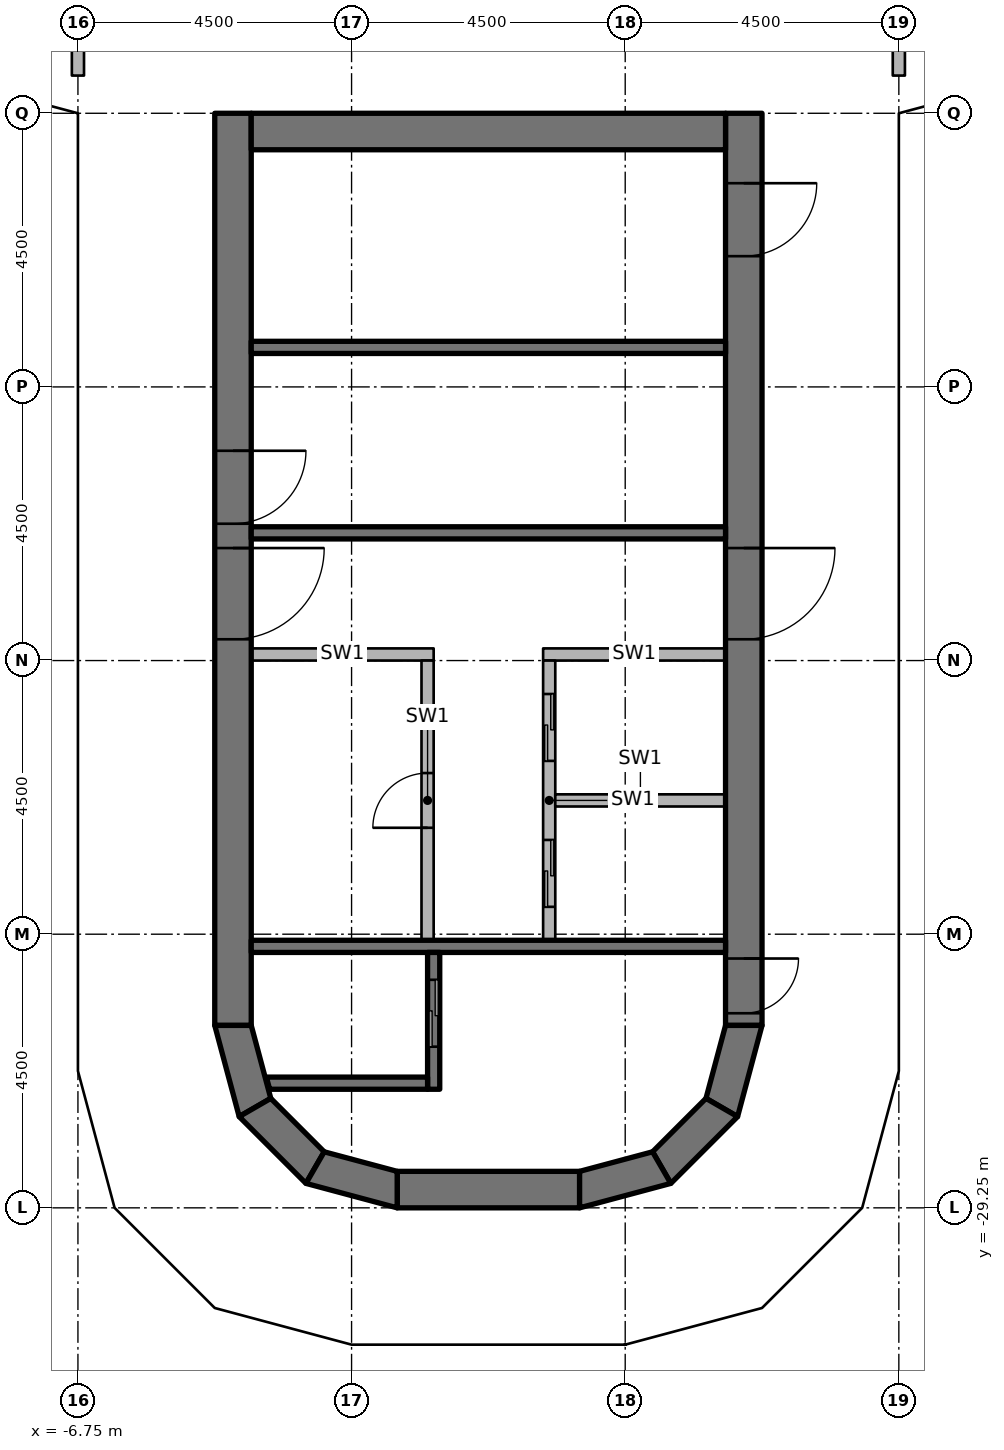
"""IFC4 building model, lengths in metres.
Left out: names, types, materials, properties, quantities, classifications, styles, units other than length and angle.
Written with IfcOpenShell. Run it as: python <this file> out.ifc"""

import sys

from ifc_helpers import new_model, si_unit, direction, frame, frame_2d, origin, origin_2d, place, context, subcontext, project, spatial, polyline, rectangle, outline, extrude, element, fill, save


model = new_model("IFC4")
c1 = context("Model", 3, precision=1e-05, world=origin(), true_north=direction((0.0, 1.0)))
c2 = subcontext(c1, "Body", "Model", "MODEL_VIEW")
j1 = project(units=[si_unit("LENGTHUNIT", "METRE"), si_unit("PLANEANGLEUNIT", "RADIAN")], contexts=[c1])
p1 = place(None, origin())
s1 = spatial("IfcSite", under=j1, at=p1, CompositionType="ELEMENT")
p2 = place(p1, origin())
s2 = spatial("IfcBuilding", under=s1, at=p2, CompositionType="ELEMENT")
p3 = place(p2, frame((0.0, 0.0, 218.2)))
s3 = spatial("IfcBuildingStorey", under=s2, at=p3, CompositionType="ELEMENT", Elevation=218.2)
for number, where, z_axis, x_axis in (
    (1, (-6.25, -26.9, 0.0), (0.0, 0.0, 1.0), (1.0, 0.0, 0.0)),
    (2, (-6.25, -24.65, 0.0), (0.0, 0.0, 1.0), (1.0, 0.0, 0.0)),
    (3, (-6.25, -20.25, 0.0), (0.0, 0.0, 1.0), (1.0, 0.0, 0.0)),
    (4, (-6.25, -15.75, 0.0), (0.0, 0.0, 1.0), (1.0, 0.0, 0.0)),
    (5, (-6.25, -10.75, 0.0), (0.0, 0.0, 1.0), (1.0, 0.0, 0.0)),
    (6, (6.25, -26.9, 0.0), (0.0, 0.0, 1.0), (1.0, 0.0, 0.0)),
    (7, (6.25, -24.65, 0.0), (0.0, 0.0, 1.0), (1.0, 0.0, 0.0)),
    (8, (6.25, -20.25, 0.0), (0.0, 0.0, 1.0), (1.0, 0.0, 0.0)),
    (9, (6.25, -15.75, 0.0), (0.0, 0.0, 1.0), (1.0, 0.0, 0.0)),
    (10, (6.25, -10.75, 0.0), (0.0, 0.0, 1.0), (1.0, 0.0, 0.0)),
):
    element("IfcColumn", number, at=place(p3, frame(where, z_axis=z_axis, x_axis=x_axis)), inside=s3, PredefinedType="COLUMN", context=c2, shape_type="SweptSolid", body=[
        extrude(rectangle(XDim=0.7, YDim=0.7, at=origin_2d()), origin(), (0.0, 0.0, 1.0), 3.65),
    ])
p4 = place(p3, frame((-4.2, -11.25, 0.0), z_axis=(0.0, 0.0, 1.0), x_axis=(0.0, -1.0, 0.0)))
e11 = element("IfcWall", 11, at=p4, inside=s3, PredefinedType="SHEAR", context=c2, shape_type="SweptSolid", body=[
    extrude(rectangle(XDim=15.0, YDim=0.6, at=frame_2d((7.5, 0.0))), origin(), (0.0, 0.0, 1.0), 3.8),
])
p5 = place(p4, frame((7.15, 0.0, 0.0)))
e12 = element("IfcOpeningElement", 12, at=p5, cuts=e11, PredefinedType="OPENING", context=c2, shape_type="SweptSolid", body=[
    extrude(rectangle(XDim=1.5, YDim=2.3, at=frame_2d((0.75, 1.15))), frame((0.0, 0.31, 0.0), z_axis=(0.0, -1.0, 0.0), x_axis=(1.0, 0.0, 0.0)), (0.0, 0.0, 1.0), 0.62),
])
p6 = place(p4, frame((5.55, 0.0, 0.0)))
e13 = element("IfcOpeningElement", 13, at=p6, cuts=e11, PredefinedType="OPENING", context=c2, shape_type="SweptSolid", body=[
    extrude(rectangle(XDim=1.2, YDim=2.1, at=frame_2d((0.6, 1.05))), frame((0.0, 0.31, 0.0), z_axis=(0.0, -1.0, 0.0), x_axis=(1.0, 0.0, 0.0)), (0.0, 0.0, 1.0), 0.62),
])
p7 = place(p3, frame((4.2, -11.25, 0.0), z_axis=(0.0, 0.0, 1.0), x_axis=(0.0, -1.0, 0.0)))
e14 = element("IfcWall", 14, at=p7, inside=s3, PredefinedType="SHEAR", context=c2, shape_type="SweptSolid", body=[
    extrude(rectangle(XDim=15.0, YDim=0.6, at=frame_2d((7.5, 0.0))), origin(), (0.0, 0.0, 1.0), 3.8),
])
p8 = place(p7, frame((7.15, 0.0, 0.0)))
e15 = element("IfcOpeningElement", 15, at=p8, cuts=e14, PredefinedType="OPENING", context=c2, shape_type="SweptSolid", body=[
    extrude(rectangle(XDim=1.5, YDim=2.3, at=frame_2d((0.75, 1.15))), frame((0.0, 0.31, 0.0), z_axis=(0.0, -1.0, 0.0), x_axis=(1.0, 0.0, 0.0)), (0.0, 0.0, 1.0), 0.62),
])
p9 = place(p7, frame((13.9, 0.0, 0.0)))
e16 = element("IfcOpeningElement", 16, at=p9, cuts=e14, PredefinedType="OPENING", context=c2, shape_type="SweptSolid", body=[
    extrude(rectangle(XDim=0.9, YDim=2.1, at=frame_2d((0.45, 1.05))), frame((0.0, 0.31, 0.0), z_axis=(0.0, -1.0, 0.0), x_axis=(1.0, 0.0, 0.0)), (0.0, 0.0, 1.0), 0.62),
])
p10 = place(p7, frame((1.15, 0.0, 0.0)))
e17 = element("IfcOpeningElement", 17, at=p10, cuts=e14, PredefinedType="OPENING", context=c2, shape_type="SweptSolid", body=[
    extrude(rectangle(XDim=1.2, YDim=2.1, at=frame_2d((0.6, 1.05))), frame((0.0, 0.31, 0.0), z_axis=(0.0, -1.0, 0.0), x_axis=(1.0, 0.0, 0.0)), (0.0, 0.0, 1.0), 0.62),
])
p11 = place(p3, frame((-3.9, -11.55, 0.0), z_axis=(0.0, 0.0, 1.0), x_axis=(1.0, 0.0, 0.0)))
e18 = element("IfcWall", 18, at=p11, inside=s3, PredefinedType="SHEAR", context=c2, shape_type="SweptSolid", body=[
    extrude(rectangle(XDim=7.8, YDim=0.6, at=frame_2d((3.9, 0.0))), origin(), (0.0, 0.0, 1.0), 3.8),
])
p12 = place(p3, frame((-1.5, -28.95, 0.0), z_axis=(0.0, 0.0, 1.0), x_axis=(1.0, 0.0, 0.0)))
e19 = element("IfcWall", 19, at=p12, inside=s3, PredefinedType="SHEAR", context=c2, shape_type="SweptSolid", body=[
    extrude(rectangle(XDim=3.0, YDim=0.6, at=frame_2d((1.5, 0.0))), origin(), (0.0, 0.0, 1.0), 3.8),
])
p13 = place(p3, origin())
e20 = element("IfcWall", 20, at=p13, inside=s3, PredefinedType="SHEAR", context=c2, shape_type="SweptSolid", body=[
    extrude(outline(polyline([(-4.5, -26.25), (-4.098, -27.75), (-3.579, -27.45), (-3.9, -26.25), (-4.5, -26.25)])), origin(), (0.0, 0.0, 1.0), 3.8),
])
p14 = place(p3, origin())
e21 = element("IfcWall", 21, at=p14, inside=s3, PredefinedType="SHEAR", context=c2, shape_type="SweptSolid", body=[
    extrude(outline(polyline([(-4.098, -27.75), (-3.0, -28.848), (-2.7, -28.329), (-3.579, -27.45), (-4.098, -27.75)])), origin(), (0.0, 0.0, 1.0), 3.8),
])
p15 = place(p3, origin())
e22 = element("IfcWall", 22, at=p15, inside=s3, PredefinedType="SHEAR", context=c2, shape_type="SweptSolid", body=[
    extrude(outline(polyline([(-3.0, -28.848), (-1.5, -29.25), (-1.5, -28.65), (-2.7, -28.329), (-3.0, -28.848)])), origin(), (0.0, 0.0, 1.0), 3.8),
])
p16 = place(p3, origin())
e23 = element("IfcWall", 23, at=p16, inside=s3, PredefinedType="SHEAR", context=c2, shape_type="SweptSolid", body=[
    extrude(outline(polyline([(4.5, -26.25), (4.098, -27.75), (3.579, -27.45), (3.9, -26.25), (4.5, -26.25)])), origin(), (0.0, 0.0, 1.0), 3.8),
])
p17 = place(p3, origin())
e24 = element("IfcWall", 24, at=p17, inside=s3, PredefinedType="SHEAR", context=c2, shape_type="SweptSolid", body=[
    extrude(outline(polyline([(4.098, -27.75), (3.0, -28.848), (2.7, -28.329), (3.579, -27.45), (4.098, -27.75)])), origin(), (0.0, 0.0, 1.0), 3.8),
])
p18 = place(p3, origin())
e25 = element("IfcWall", 25, at=p18, inside=s3, PredefinedType="SHEAR", context=c2, shape_type="SweptSolid", body=[
    extrude(outline(polyline([(3.0, -28.848), (1.5, -29.25), (1.5, -28.65), (2.7, -28.329), (3.0, -28.848)])), origin(), (0.0, 0.0, 1.0), 3.8),
])
p19 = place(p3, frame((3.9, -24.95, 0.0), z_axis=(0.0, 0.0, 1.0), x_axis=(-1.0, 0.0, 0.0)))
e26 = element("IfcWall", 26, at=p19, inside=s3, PredefinedType="SHEAR", context=c2, shape_type="SweptSolid", body=[
    extrude(rectangle(XDim=7.8, YDim=0.2, at=frame_2d((3.9, 0.0))), origin(), (0.0, 0.0, 1.0), 3.65),
])
p20 = place(p3, frame((-0.9, -27.3, 0.0), z_axis=(0.0, 0.0, 1.0), x_axis=(0.0, 1.0, 0.0)))
e27 = element("IfcWall", 27, at=p20, inside=s3, PredefinedType="SHEAR", context=c2, shape_type="SweptSolid", body=[
    extrude(rectangle(XDim=2.25, YDim=0.2, at=frame_2d((1.125, 0.0))), origin(), (0.0, 0.0, 1.0), 3.65),
])
p21 = place(p20, frame((0.7, 0.0, 0.0)))
e28 = element("IfcOpeningElement", 28, at=p21, cuts=e27, PredefinedType="OPENING", context=c2, shape_type="SweptSolid", body=[
    extrude(rectangle(XDim=1.1, YDim=2.3, at=frame_2d((0.55, 1.15))), frame((0.0, 0.11, 0.0), z_axis=(0.0, -1.0, 0.0), x_axis=(1.0, 0.0, 0.0)), (0.0, 0.0, 1.0), 0.22),
])
p22 = place(p3, origin())
e29 = element("IfcWall", 29, at=p22, inside=s3, PredefinedType="SHEAR", context=c2, shape_type="SweptSolid", body=[
    extrude(outline(polyline([(-1.0, -27.1), (-3.651, -27.1), (-3.597, -27.3), (-1.0, -27.3), (-1.0, -27.1)])), origin(), (0.0, 0.0, 1.0), 3.65),
])
for number, where, z_axis, x_axis in (
    (30, (3.9, -18.15, 0.0), (0.0, 0.0, 1.0), (-1.0, 0.0, 0.0)),
    (31, (3.9, -15.1, 0.0), (0.0, 0.0, 1.0), (-1.0, 0.0, 0.0)),
):
    element("IfcWall", number, at=place(p3, frame(where, z_axis=z_axis, x_axis=x_axis)), inside=s3, PredefinedType="SHEAR", context=c2, shape_type="SweptSolid", body=[
        extrude(rectangle(XDim=7.8, YDim=0.2, at=frame_2d((3.9, 0.0))), origin(), (0.0, 0.0, 1.0), 3.65),
    ])
p23 = place(p3, frame((3.9, -20.15, 0.0), z_axis=(0.0, 0.0, 1.0), x_axis=(-1.0, 0.0, 0.0)))
e32 = element("IfcWall", 32, at=p23, inside=s3, PredefinedType="PARTITIONING", context=c2, shape_type="SweptSolid", body=[
    extrude(rectangle(XDim=3.0, YDim=0.2, at=frame_2d((1.5, 0.0))), origin(), (0.0, 0.0, 1.0), 3.65),
])
p24 = place(p3, frame((1.0, -24.85, 0.0), z_axis=(0.0, 0.0, 1.0), x_axis=(0.0, 1.0, 0.0)))
e33 = element("IfcWall", 33, at=p24, inside=s3, PredefinedType="PARTITIONING", context=c2, shape_type="SweptSolid", body=[
    extrude(rectangle(XDim=4.6, YDim=0.2, at=frame_2d((2.3, 0.0))), origin(), (0.0, 0.0, 1.0), 3.65),
])
p25 = place(p24, frame((0.55, 0.0, 0.0)))
e34 = element("IfcOpeningElement", 34, at=p25, cuts=e33, PredefinedType="OPENING", context=c2, shape_type="SweptSolid", body=[
    extrude(rectangle(XDim=1.1, YDim=2.3, at=frame_2d((0.55, 1.15))), frame((0.0, 0.11, 0.0), z_axis=(0.0, -1.0, 0.0), x_axis=(1.0, 0.0, 0.0)), (0.0, 0.0, 1.0), 0.22),
])
p26 = place(p24, frame((2.95, 0.0, 0.0)))
e35 = element("IfcOpeningElement", 35, at=p26, cuts=e33, PredefinedType="OPENING", context=c2, shape_type="SweptSolid", body=[
    extrude(rectangle(XDim=1.1, YDim=2.3, at=frame_2d((0.55, 1.15))), frame((0.0, 0.11, 0.0), z_axis=(0.0, -1.0, 0.0), x_axis=(1.0, 0.0, 0.0)), (0.0, 0.0, 1.0), 0.22),
])
p27 = place(p3, frame((-0.9, -20.15, 0.0), z_axis=(0.0, 0.0, 1.0), x_axis=(-1.0, 0.0, 0.0)))
e36 = element("IfcWall", 36, at=p27, inside=s3, PredefinedType="PARTITIONING", context=c2, shape_type="SweptSolid", body=[
    extrude(rectangle(XDim=3.0, YDim=0.2, at=frame_2d((1.5, 0.0))), origin(), (0.0, 0.0, 1.0), 3.65),
])
p28 = place(p3, frame((-1.0, -24.85, 0.0), z_axis=(0.0, 0.0, 1.0), x_axis=(0.0, 1.0, 0.0)))
e37 = element("IfcWall", 37, at=p28, inside=s3, PredefinedType="PARTITIONING", context=c2, shape_type="SweptSolid", body=[
    extrude(rectangle(XDim=4.6, YDim=0.2, at=frame_2d((2.3, 0.0))), origin(), (0.0, 0.0, 1.0), 3.65),
])
p29 = place(p28, frame((1.85, 0.0, 0.0)))
e38 = element("IfcOpeningElement", 38, at=p29, cuts=e37, PredefinedType="OPENING", context=c2, shape_type="SweptSolid", body=[
    extrude(rectangle(XDim=0.9, YDim=2.1, at=frame_2d((0.45, 1.05))), frame((0.0, 0.11, 0.0), z_axis=(0.0, -1.0, 0.0), x_axis=(1.0, 0.0, 0.0)), (0.0, 0.0, 1.0), 0.22),
])
p30 = place(p3, frame((3.9, -22.55, 0.0), z_axis=(0.0, 0.0, 1.0), x_axis=(-1.0, 0.0, 0.0)))
e39 = element("IfcWall", 39, at=p30, inside=s3, PredefinedType="PARTITIONING", context=c2, shape_type="SweptSolid", body=[
    extrude(rectangle(XDim=2.8, YDim=0.2, at=frame_2d((1.4, 0.0))), origin(), (0.0, 0.0, 1.0), 3.65),
])
p31 = place(p3, frame((6.75, -6.85, 0.0), z_axis=(0.0, 0.0, 1.0), x_axis=(0.0, -1.0, 0.0)))
e40 = element("IfcWall", 40, at=p31, inside=s3, PredefinedType="PARTITIONING", context=c2, shape_type="SweptSolid", body=[
    extrude(rectangle(XDim=3.78, YDim=0.2, at=frame_2d((1.89, 0.0))), origin(), (0.0, 0.0, 1.0), 2.75),
])
p32 = place(p31, frame((1.44, 0.0, 0.0)))
e41 = element("IfcOpeningElement", 41, at=p32, cuts=e40, PredefinedType="OPENING", context=c2, shape_type="SweptSolid", body=[
    extrude(rectangle(XDim=0.9, YDim=2.1, at=frame_2d((0.45, 1.05))), frame((0.0, 0.11, 0.0), z_axis=(0.0, -1.0, 0.0), x_axis=(1.0, 0.0, 0.0)), (0.0, 0.0, 1.0), 0.22),
])
p33 = place(p3, frame((-6.75, -10.63, 0.0), z_axis=(0.0, 0.0, 1.0), x_axis=(0.0, 1.0, 0.0)))
e42 = element("IfcWall", 42, at=p33, inside=s3, PredefinedType="PARTITIONING", context=c2, shape_type="SweptSolid", body=[
    extrude(rectangle(XDim=3.78, YDim=0.2, at=frame_2d((1.89, 0.0))), origin(), (0.0, 0.0, 1.0), 2.75),
])
p34 = place(p8, origin())
e43 = element("IfcDoor", 43, at=p34, inside=s3, OperationType="DOUBLE_DOOR_SINGLE_SWING", PredefinedType="DOOR", context=c2, shape_type="SweptSolid", body=[
    extrude(rectangle(XDim=1.5, YDim=2.3, at=frame_2d((0.75, 1.15))), frame((0.0, 0.025, 0.0), z_axis=(0.0, -1.0, 0.0), x_axis=(1.0, 0.0, 0.0)), (0.0, 0.0, 1.0), 0.05),
])
fill(e15, e43)
p35 = place(p5, origin())
e44 = element("IfcDoor", 44, at=p35, inside=s3, OperationType="DOUBLE_DOOR_SINGLE_SWING", PredefinedType="DOOR", context=c2, shape_type="SweptSolid", body=[
    extrude(rectangle(XDim=1.5, YDim=2.3, at=frame_2d((0.75, 1.15))), frame((0.0, 0.025, 0.0), z_axis=(0.0, -1.0, 0.0), x_axis=(1.0, 0.0, 0.0)), (0.0, 0.0, 1.0), 0.05),
])
fill(e12, e44)
p36 = place(p9, origin())
e45 = element("IfcDoor", 45, at=p36, inside=s3, OperationType="SINGLE_SWING_RIGHT", PredefinedType="DOOR", context=c2, shape_type="SweptSolid", body=[
    extrude(rectangle(XDim=0.9, YDim=2.1, at=frame_2d((0.45, 1.05))), frame((0.0, 0.025, 0.0), z_axis=(0.0, -1.0, 0.0), x_axis=(1.0, 0.0, 0.0)), (0.0, 0.0, 1.0), 0.05),
])
fill(e16, e45)
p37 = place(p6, origin())
e46 = element("IfcDoor", 46, at=p37, inside=s3, OperationType="SINGLE_SWING_RIGHT", PredefinedType="DOOR", context=c2, shape_type="SweptSolid", body=[
    extrude(rectangle(XDim=1.2, YDim=2.1, at=frame_2d((0.6, 1.05))), frame((0.0, 0.025, 0.0), z_axis=(0.0, -1.0, 0.0), x_axis=(1.0, 0.0, 0.0)), (0.0, 0.0, 1.0), 0.05),
])
fill(e13, e46)
p38 = place(p10, origin())
e47 = element("IfcDoor", 47, at=p38, inside=s3, OperationType="SINGLE_SWING_RIGHT", PredefinedType="DOOR", context=c2, shape_type="SweptSolid", body=[
    extrude(rectangle(XDim=1.2, YDim=2.1, at=frame_2d((0.6, 1.05))), frame((0.0, 0.025, 0.0), z_axis=(0.0, -1.0, 0.0), x_axis=(1.0, 0.0, 0.0)), (0.0, 0.0, 1.0), 0.05),
])
fill(e17, e47)
p39 = place(p21, origin())
e48 = element("IfcDoor", 48, at=p39, inside=s3, OperationType="DOUBLE_DOOR_SLIDING", PredefinedType="DOOR", context=c2, shape_type="SweptSolid", body=[
    extrude(rectangle(XDim=1.1, YDim=2.3, at=frame_2d((0.55, 1.15))), frame((0.0, 0.025, 0.0), z_axis=(0.0, -1.0, 0.0), x_axis=(1.0, 0.0, 0.0)), (0.0, 0.0, 1.0), 0.05),
])
fill(e28, e48)
p40 = place(p25, origin())
e49 = element("IfcDoor", 49, at=p40, inside=s3, OperationType="DOUBLE_DOOR_SLIDING", PredefinedType="DOOR", context=c2, shape_type="SweptSolid", body=[
    extrude(rectangle(XDim=1.1, YDim=2.3, at=frame_2d((0.55, 1.15))), frame((0.0, 0.025, 0.0), z_axis=(0.0, -1.0, 0.0), x_axis=(1.0, 0.0, 0.0)), (0.0, 0.0, 1.0), 0.05),
])
fill(e34, e49)
p41 = place(p26, origin())
e50 = element("IfcDoor", 50, at=p41, inside=s3, OperationType="DOUBLE_DOOR_SLIDING", PredefinedType="DOOR", context=c2, shape_type="SweptSolid", body=[
    extrude(rectangle(XDim=1.1, YDim=2.3, at=frame_2d((0.55, 1.15))), frame((0.0, 0.025, 0.0), z_axis=(0.0, -1.0, 0.0), x_axis=(1.0, 0.0, 0.0)), (0.0, 0.0, 1.0), 0.05),
])
fill(e35, e50)
p42 = place(p29, origin())
e51 = element("IfcDoor", 51, at=p42, inside=s3, OperationType="SINGLE_SWING_RIGHT", PredefinedType="DOOR", context=c2, shape_type="SweptSolid", body=[
    extrude(rectangle(XDim=0.9, YDim=2.1, at=frame_2d((0.45, 1.05))), frame((0.0, 0.025, 0.0), z_axis=(0.0, -1.0, 0.0), x_axis=(1.0, 0.0, 0.0)), (0.0, 0.0, 1.0), 0.05),
])
fill(e38, e51)
save(model, sys.argv[1])
